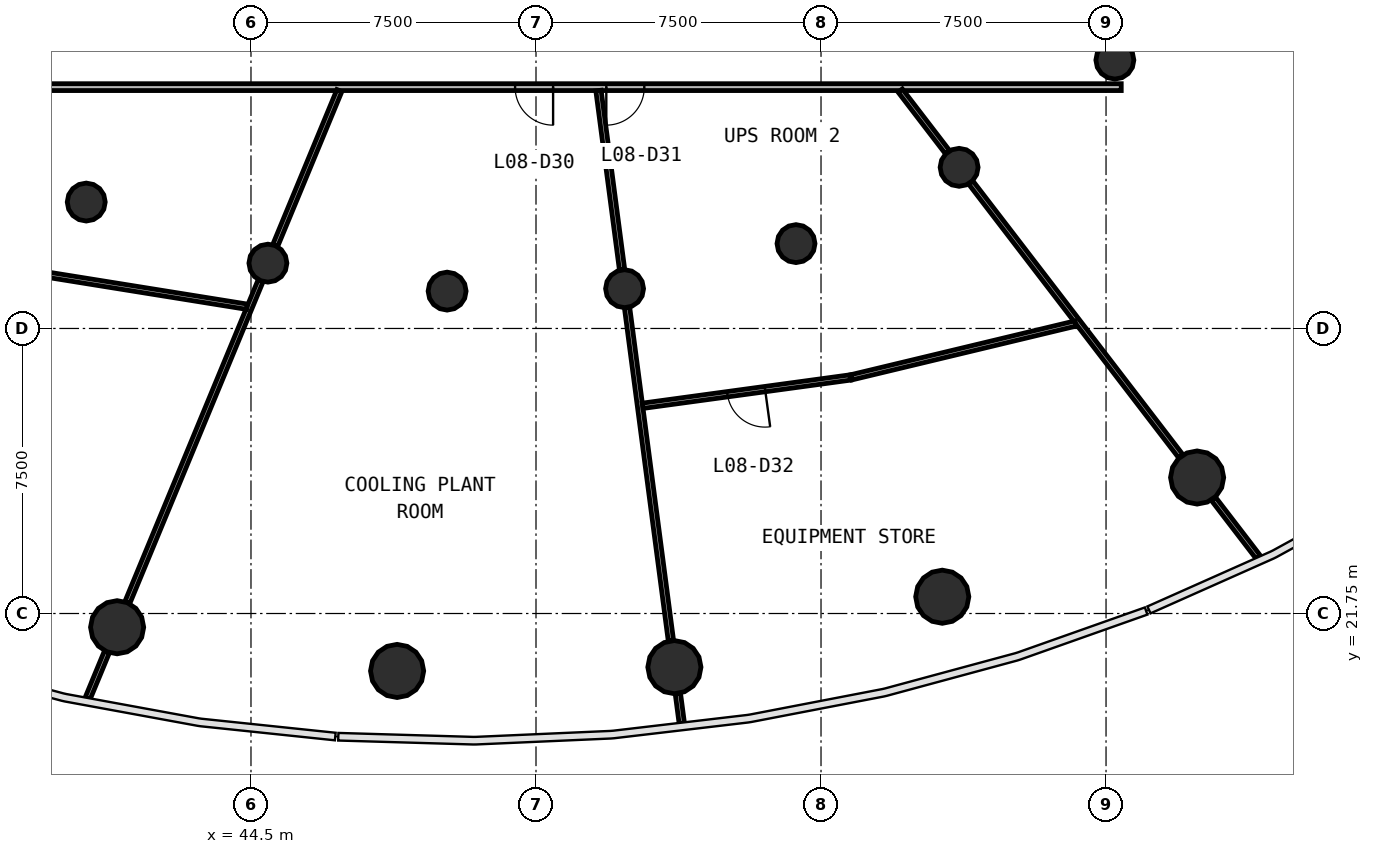
"""IFC4 building model, lengths in metres.
Left out: names, types, materials, properties, quantities, classifications, styles, units other than length and angle.
Written with IfcOpenShell. Run it as: python <this file> out.ifc"""

import sys

from ifc_helpers import new_model, si_unit, direction, frame, frame_2d, origin, origin_2d, place, context, subcontext, project, spatial, rectangle, circle, extrude, source, transform, mapped, element, fill, save


model = new_model("IFC4")
c1 = context("Model", 3, precision=1e-05, world=origin(), true_north=direction((0.0, 1.0)))
c2 = subcontext(c1, "Body", "Model", "MODEL_VIEW")
j1 = project(units=[si_unit("LENGTHUNIT", "METRE"), si_unit("PLANEANGLEUNIT", "RADIAN")], contexts=[c1])
p1 = place(None, origin())
s1 = spatial("IfcSite", under=j1, at=p1, CompositionType="ELEMENT")
p2 = place(p1, origin())
s2 = spatial("IfcBuilding", under=s1, at=p2, CompositionType="ELEMENT")
p3 = place(p2, frame((0.0, 0.0, 35.8)))
s3 = spatial("IfcBuildingStorey", under=s2, at=p3, CompositionType="ELEMENT", Elevation=35.8)
m1 = source(origin(), c2, "Body", "SweptSolid", [
    extrude(circle(Radius=0.7, at=origin_2d()), origin(), (0.0, 0.0, 1.0), 4.4),
])
for number, where, z_axis, x_axis in (
    (1, (40.977, 21.389, 0.0), (0.0, 0.0, 1.0), (1.0, 0.0, 0.0)),
    (2, (48.345, 20.239, 0.0), (0.0, 0.0, 1.0), (1.0, 0.0, 0.0)),
    (3, (55.642, 20.339, 0.0), (0.0, 0.0, 1.0), (1.0, 0.0, 0.0)),
    (4, (62.69, 22.191, 0.0), (0.0, 0.0, 1.0), (1.0, 0.0, 0.0)),
    (5, (69.396, 25.328, 0.0), (0.0, 0.0, 1.0), (1.0, 0.0, 0.0)),
):
    element("IfcColumn", number, at=place(p3, frame(where, z_axis=z_axis, x_axis=x_axis)), inside=s3, PredefinedType="COLUMN", context=c2, shape_type="MappedRepresentation", body=[
        mapped(m1, transform((0.0, 0.0, 0.0), scale=1.0)),
    ])
m2 = source(origin(), c2, "Body", "SweptSolid", [
    extrude(circle(Radius=0.5, at=origin_2d()), origin(), (0.0, 0.0, 1.0), 4.4),
])
for number, where, z_axis, x_axis in (
    (6, (40.165, 32.576, 0.0), (0.0, 0.0, 1.0), (1.0, 0.0, 0.0)),
    (7, (44.945, 30.969, 0.0), (0.0, 0.0, 1.0), (1.0, 0.0, 0.0)),
    (8, (49.661, 30.233, 0.0), (0.0, 0.0, 1.0), (1.0, 0.0, 0.0)),
    (9, (54.331, 30.297, 0.0), (0.0, 0.0, 1.0), (1.0, 0.0, 0.0)),
    (10, (58.842, 31.482, 0.0), (0.0, 0.0, 1.0), (1.0, 0.0, 0.0)),
    (11, (63.134, 33.49, 0.0), (0.0, 0.0, 1.0), (1.0, 0.0, 0.0)),
    (12, (67.232, 36.312, 0.0), (0.0, 0.0, 1.0), (1.0, 0.0, 0.0)),
):
    element("IfcColumn", number, at=place(p3, frame(where, z_axis=z_axis, x_axis=x_axis)), inside=s3, PredefinedType="COLUMN", context=c2, shape_type="MappedRepresentation", body=[
        mapped(m2, transform((0.0, 0.0, 0.0), scale=1.0)),
    ])
p4 = place(p3, frame((67.4, 35.6, 0.0), z_axis=(0.0, 0.0, 1.0), x_axis=(-1.0, 0.0, 0.0)))
e13 = element("IfcWall", 13, at=p4, inside=s3, PredefinedType="PARTITIONING", context=c2, shape_type="SweptSolid", body=[
    extrude(rectangle(XDim=30.8, YDim=0.18, at=frame_2d((15.4, 0.0))), origin(), (0.0, 0.0, 1.0), 3.05),
])
p5 = place(p4, frame((14.95, 0.0, 0.0)))
e14 = element("IfcOpeningElement", 14, at=p5, cuts=e13, PredefinedType="OPENING", context=c2, shape_type="SweptSolid", body=[
    extrude(rectangle(XDim=1.0, YDim=2.1, at=frame_2d((0.5, 1.05))), frame((0.0, 0.1, 0.0), z_axis=(0.0, -1.0, 0.0), x_axis=(1.0, 0.0, 0.0)), (0.0, 0.0, 1.0), 0.2),
])
p6 = place(p4, frame((12.55, 0.0, 0.0)))
e15 = element("IfcOpeningElement", 15, at=p6, cuts=e13, PredefinedType="OPENING", context=c2, shape_type="SweptSolid", body=[
    extrude(rectangle(XDim=1.0, YDim=2.1, at=frame_2d((0.5, 1.05))), frame((0.0, 0.1, 0.0), z_axis=(0.0, -1.0, 0.0), x_axis=(1.0, 0.0, 0.0)), (0.0, 0.0, 1.0), 0.2),
])
p7 = place(p3, frame((41.247, 22.04, 0.0), z_axis=(0.0, 0.0, 1.0), x_axis=(0.382672728165, 0.923883966264, 0.0)))
e16 = element("IfcWall", 16, at=p7, inside=s3, PredefinedType="PARTITIONING", context=c2, shape_type="SweptSolid", body=[
    extrude(rectangle(XDim=9.16, YDim=0.14, at=frame_2d((4.58, 0.0))), origin(), (0.0, 0.0, 1.0), 3.05),
])
p8 = place(p3, frame((63.441, 33.09, 0.0), z_axis=(0.0, 0.0, 1.0), x_axis=(0.608770769454, -0.793346173028, 0.0)))
e17 = element("IfcWall", 17, at=p8, inside=s3, PredefinedType="PARTITIONING", context=c2, shape_type="SweptSolid", body=[
    extrude(rectangle(XDim=9.079, YDim=0.14, at=frame_2d((4.54, 0.0))), origin(), (0.0, 0.0, 1.0), 3.05),
])
p9 = place(p3, frame((54.396, 29.797, 0.0), z_axis=(0.0, 0.0, 1.0), x_axis=(0.130534568438, -0.991443758588, 0.0)))
e18 = element("IfcWall", 18, at=p9, inside=s3, PredefinedType="PARTITIONING", context=c2, shape_type="SweptSolid", body=[
    extrude(rectangle(XDim=8.835, YDim=0.14, at=frame_2d((4.418, 0.0))), origin(), (0.0, 0.0, 1.0), 3.05),
])
p10 = place(p3, frame((60.299, 27.965, 0.0), z_axis=(0.0, 0.0, 1.0), x_axis=(0.972356247256, 0.233502309242, 0.0)))
e19 = element("IfcWall", 19, at=p10, inside=s3, PredefinedType="PARTITIONING", context=c2, shape_type="SweptSolid", body=[
    extrude(rectangle(XDim=6.067, YDim=0.14, at=frame_2d((3.034, 0.0))), origin(), (0.0, 0.0, 1.0), 3.05),
])
p11 = place(p3, frame((38.777, 30.724, 0.0), z_axis=(0.0, 0.0, 1.0), x_axis=(0.987350770866, -0.158551112488, 0.0)))
e20 = element("IfcWall", 20, at=p11, inside=s3, PredefinedType="PARTITIONING", context=c2, shape_type="SweptSolid", body=[
    extrude(rectangle(XDim=5.69, YDim=0.14, at=frame_2d((2.845, 0.0))), origin(), (0.0, 0.0, 1.0), 3.05),
])
p12 = place(p3, frame((60.269, 27.96, 0.0), z_axis=(0.0, 0.0, 1.0), x_axis=(-0.99082423852, -0.135156680789, 0.0)))
e21 = element("IfcWall", 21, at=p12, inside=s3, PredefinedType="PARTITIONING", context=c2, shape_type="SweptSolid", body=[
    extrude(rectangle(XDim=5.513, YDim=0.14, at=frame_2d((2.756, 0.0))), origin(), (0.0, 0.0, 1.0), 3.05),
])
p13 = place(p12, frame((2.263, 0.0, 0.0)))
e22 = element("IfcOpeningElement", 22, at=p13, cuts=e21, PredefinedType="OPENING", context=c2, shape_type="SweptSolid", body=[
    extrude(rectangle(XDim=1.0, YDim=2.1, at=frame_2d((0.5, 1.05))), frame((0.0, 0.08, 0.0), z_axis=(0.0, -1.0, 0.0), x_axis=(1.0, 0.0, 0.0)), (0.0, 0.0, 1.0), 0.16),
])
p14 = place(p3, frame((53.644, 35.51, 0.0), z_axis=(0.0, 0.0, 1.0), x_axis=(0.130548834981, -0.991441880135, 0.0)))
e23 = element("IfcWall", 23, at=p14, inside=s3, PredefinedType="PARTITIONING", context=c2, shape_type="SweptSolid", body=[
    extrude(rectangle(XDim=4.754, YDim=0.14, at=frame_2d((2.377, 0.0))), origin(), (0.0, 0.0, 1.0), 3.05),
])
p15 = place(p3, frame((46.826, 35.51, 0.0), z_axis=(0.0, 0.0, 1.0), x_axis=(-0.382672831764, -0.923883923353, 0.0)))
e24 = element("IfcWall", 24, at=p15, inside=s3, PredefinedType="PARTITIONING", context=c2, shape_type="SweptSolid", body=[
    extrude(rectangle(XDim=4.41, YDim=0.14, at=frame_2d((2.205, 0.0))), origin(), (0.0, 0.0, 1.0), 3.05),
])
p16 = place(p3, frame((61.584, 35.51, 0.0), z_axis=(0.0, 0.0, 1.0), x_axis=(0.608727763541, -0.793379171578, 0.0)))
e25 = element("IfcWall", 25, at=p16, inside=s3, PredefinedType="PARTITIONING", context=c2, shape_type="SweptSolid", body=[
    extrude(rectangle(XDim=2.042, YDim=0.14, at=frame_2d((1.021, 0.0))), origin(), (0.0, 0.0, 1.0), 3.05),
])
p17 = place(p3, frame((69.825, 24.77, 0.0), z_axis=(0.0, 0.0, 1.0), x_axis=(0.608846424219, -0.793288113938, 0.0)))
e26 = element("IfcWall", 26, at=p17, inside=s3, PredefinedType="PARTITIONING", context=c2, shape_type="SweptSolid", body=[
    extrude(rectangle(XDim=1.939, YDim=0.14, at=frame_2d((0.97, 0.0))), origin(), (0.0, 0.0, 1.0), 3.05),
])
p18 = place(p3, frame((40.708, 20.737, 0.0), z_axis=(0.0, 0.0, 1.0), x_axis=(-0.382814774468, -0.923825117892, 0.0)))
e27 = element("IfcWall", 27, at=p18, inside=s3, PredefinedType="PARTITIONING", context=c2, shape_type="SweptSolid", body=[
    extrude(rectangle(XDim=1.32, YDim=0.14, at=frame_2d((0.66, 0.0))), origin(), (0.0, 0.0, 1.0), 3.05),
])
p19 = place(p3, frame((55.734, 19.64, 0.0), z_axis=(0.0, 0.0, 1.0), x_axis=(0.130566295976, -0.991439580789, 0.0)))
e28 = element("IfcWall", 28, at=p19, inside=s3, PredefinedType="PARTITIONING", context=c2, shape_type="SweptSolid", body=[
    extrude(rectangle(XDim=0.791, YDim=0.14, at=frame_2d((0.396, 0.0))), origin(), (0.0, 0.0, 1.0), 3.05),
])
m3 = source(origin(), c2, "Body", "SweptSolid", [
    extrude(rectangle(XDim=1.0, YDim=2.1, at=frame_2d((0.5, 1.05))), frame((0.0, 0.025, 0.0), z_axis=(0.0, -1.0, 0.0), x_axis=(1.0, 0.0, 0.0)), (0.0, 0.0, 1.0), 0.05),
])
p20 = place(p5, origin())
e29 = element("IfcDoor", 29, at=p20, inside=s3, OperationType="SINGLE_SWING_LEFT", PredefinedType="DOOR", context=c2, shape_type="MappedRepresentation", body=[
    mapped(m3, transform((0.0, 0.0, 0.0), scale=1.0)),
])
fill(e14, e29)
p21 = place(p6, origin())
e30 = element("IfcDoor", 30, at=p21, inside=s3, OperationType="SINGLE_SWING_RIGHT", PredefinedType="DOOR", context=c2, shape_type="MappedRepresentation", body=[
    mapped(m3, transform((0.0, 0.0, 0.0), scale=1.0)),
])
fill(e15, e30)
p22 = place(p13, origin())
e31 = element("IfcDoor", 31, at=p22, inside=s3, OperationType="SINGLE_SWING_LEFT", PredefinedType="DOOR", context=c2, shape_type="MappedRepresentation", body=[
    mapped(m3, transform((0.0, 0.0, 0.0), scale=1.0)),
])
fill(e22, e31)
save(model, sys.argv[1])
